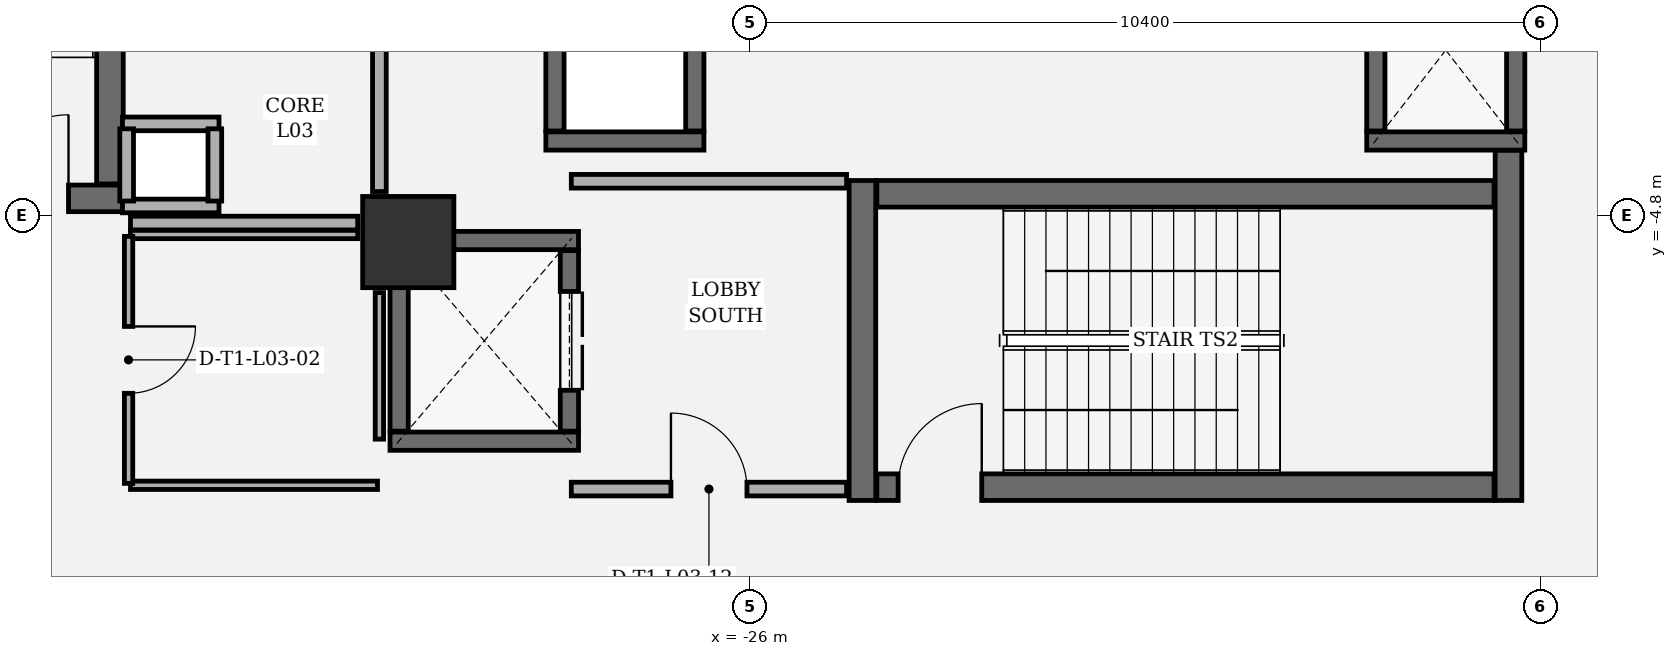
"""IFC4 building model, lengths in metres.
Left out: names, types, materials, properties, quantities, classifications, styles, units other than length and angle.
Written with IfcOpenShell. Run it as: python <this file> out.ifc"""

import sys

from ifc_helpers import new_model, si_unit, direction, frame, frame_2d, origin, origin_2d, place, context, subcontext, project, spatial, rectangle, extrude, element, fill, save


model = new_model("IFC4")
c1 = context("Model", 3, precision=1e-05, world=origin(), true_north=direction((0.0, 1.0)))
c2 = subcontext(c1, "Body", "Model", "MODEL_VIEW")
j1 = project(units=[si_unit("LENGTHUNIT", "METRE"), si_unit("PLANEANGLEUNIT", "RADIAN")], contexts=[c1])
p1 = place(None, origin())
s1 = spatial("IfcSite", under=j1, at=p1, CompositionType="ELEMENT")
p2 = place(p1, origin())
s2 = spatial("IfcBuilding", under=s1, at=p2, CompositionType="ELEMENT")
p3 = place(p2, frame((0.0, 0.0, 17.0)))
s3 = spatial("IfcBuildingStorey", under=s2, at=p3, CompositionType="ELEMENT", Elevation=17.0)
p4 = place(p3, frame((-30.5, -5.15, 0.0), z_axis=(0.0, 0.0, 1.0), x_axis=(1.0, 0.0, 0.0)))
e1 = element("IfcColumn", 1, at=p4, inside=s3, PredefinedType="COLUMN", context=c2, shape_type="SweptSolid", body=[
    extrude(rectangle(XDim=1.2, YDim=1.2, at=origin_2d()), origin(), (0.0, 0.0, 1.0), 5.0),
])
p5 = place(p3, frame((-13.635, -37.094, 0.0), z_axis=(0.0, 0.0, 1.0), x_axis=(-0.842602364841, 0.538536214905, 0.0)))
e2 = element("IfcWall", 2, at=p5, inside=s3, PredefinedType="SOLIDWALL", context=c2, shape_type="SweptSolid", body=[
    extrude(rectangle(XDim=60.27, YDim=0.38, at=frame_2d((30.135, 0.0))), origin(), (0.0, 0.0, 1.0), 4.74),
])
p6 = place(p5, frame((29.435, 0.0, 0.8)))
e3 = element("IfcOpeningElement", 3, at=p6, cuts=e2, PredefinedType="OPENING", context=c2, shape_type="SweptSolid", body=[
    extrude(rectangle(XDim=1.4, YDim=1.5, at=frame_2d((0.7, 0.75))), frame((0.0, 0.2, 0.0), z_axis=(0.0, -1.0, 0.0), x_axis=(1.0, 0.0, 0.0)), (0.0, 0.0, 1.0), 0.4),
])
p7 = place(p3, frame((-24.525, -4.34, 0.0), z_axis=(0.0, 0.0, 1.0), x_axis=(0.0, -1.0, 0.0)))
e4 = element("IfcWall", 4, at=p7, inside=s3, PredefinedType="SHEAR", context=c2, shape_type="SweptSolid", body=[
    extrude(rectangle(XDim=4.21, YDim=0.35, at=frame_2d((2.105, 0.0))), origin(), (0.0, 0.0, 1.0), 4.74),
])
p8 = place(p3, frame((-16.025, -8.55, 0.0), z_axis=(0.0, 0.0, 1.0), x_axis=(0.0, 1.0, 0.0)))
e5 = element("IfcWall", 5, at=p8, inside=s3, PredefinedType="SHEAR", context=c2, shape_type="SweptSolid", body=[
    extrude(rectangle(XDim=4.61, YDim=0.35, at=frame_2d((2.305, 0.0))), origin(), (0.0, 0.0, 1.0), 4.74),
])
p9 = place(p3, frame((-24.335, -8.375, 0.0), z_axis=(0.0, 0.0, 1.0), x_axis=(1.0, 0.0, 0.0)))
e6 = element("IfcWall", 6, at=p9, inside=s3, PredefinedType="SHEAR", context=c2, shape_type="SweptSolid", body=[
    extrude(rectangle(XDim=8.12, YDim=0.35, at=frame_2d((4.06, 0.0))), origin(), (0.0, 0.0, 1.0), 4.74),
])
p10 = place(p9, frame((0.28, 0.0, 0.0)))
e7 = element("IfcOpeningElement", 7, at=p10, cuts=e6, PredefinedType="OPENING", context=c2, shape_type="SweptSolid", body=[
    extrude(rectangle(XDim=1.1, YDim=2.2, at=frame_2d((0.55, 1.1))), frame((0.0, 0.185, 0.0), z_axis=(0.0, -1.0, 0.0), x_axis=(1.0, 0.0, 0.0)), (0.0, 0.0, 1.0), 0.37),
])
p11 = place(p3, frame((-16.215, -4.515, 0.0), z_axis=(0.0, 0.0, 1.0), x_axis=(-1.0, 0.0, 0.0)))
e8 = element("IfcWall", 8, at=p11, inside=s3, PredefinedType="SHEAR", context=c2, shape_type="SweptSolid", body=[
    extrude(rectangle(XDim=8.12, YDim=0.35, at=frame_2d((4.06, 0.0))), origin(), (0.0, 0.0, 1.0), 4.74),
])
p12 = place(p3, frame((-38.46, -4.575, 0.0), z_axis=(0.0, 0.0, 1.0), x_axis=(1.0, 0.0, 0.0)))
e9 = element("IfcWall", 9, at=p12, inside=s3, PredefinedType="SHEAR", context=c2, shape_type="SweptSolid", body=[
    extrude(rectangle(XDim=4.21, YDim=0.35, at=frame_2d((2.105, 0.0))), origin(), (0.0, 0.0, 1.0), 4.74),
])
p13 = place(p12, frame((2.39, 0.0, 0.0)))
e10 = element("IfcOpeningElement", 10, at=p13, cuts=e9, PredefinedType="OPENING", context=c2, shape_type="SweptSolid", body=[
    extrude(rectangle(XDim=1.1, YDim=2.2, at=frame_2d((0.55, 1.1))), frame((0.0, 0.185, 0.0), z_axis=(0.0, -1.0, 0.0), x_axis=(1.0, 0.0, 0.0)), (0.0, 0.0, 1.0), 0.37),
])
p14 = place(p3, frame((-34.425, -4.385, 0.0), z_axis=(0.0, 0.0, 1.0), x_axis=(0.0, 1.0, 0.0)))
e11 = element("IfcWall", 11, at=p14, inside=s3, PredefinedType="SHEAR", context=c2, shape_type="SweptSolid", body=[
    extrude(rectangle(XDim=8.77, YDim=0.35, at=frame_2d((4.385, 0.0))), origin(), (0.0, 0.0, 1.0), 4.74),
])
for number, where, z_axis, x_axis in (
    (12, (-28.26, -7.77, 0.0), (0.0, 0.0, 1.0), (-1.0, 0.0, 0.0)),
    (13, (-30.74, -5.13, 0.0), (0.0, 0.0, 1.0), (1.0, 0.0, 0.0)),
):
    element("IfcWall", number, at=place(p3, frame(where, z_axis=z_axis, x_axis=x_axis)), inside=s3, PredefinedType="SHEAR", context=c2, shape_type="SweptSolid", body=[
        extrude(rectangle(XDim=2.48, YDim=0.24, at=frame_2d((1.24, 0.0))), origin(), (0.0, 0.0, 1.0), 4.74),
    ])
p15 = place(p3, frame((-30.62, -7.638, 0.0), z_axis=(0.0, 0.0, 1.0), x_axis=(0.0, 1.0, 0.0)))
e14 = element("IfcWall", 14, at=p15, inside=s3, PredefinedType="SHEAR", context=c2, shape_type="SweptSolid", body=[
    extrude(rectangle(XDim=2.376, YDim=0.24, at=frame_2d((1.188, 0.0))), origin(), (0.0, 0.0, 1.0), 4.74),
])
p16 = place(p3, frame((-28.38, -5.262, 0.0), z_axis=(0.0, 0.0, 1.0), x_axis=(0.0, -1.0, 0.0)))
e15 = element("IfcWall", 15, at=p16, inside=s3, PredefinedType="SHEAR", context=c2, shape_type="SweptSolid", body=[
    extrude(rectangle(XDim=2.376, YDim=0.24, at=frame_2d((1.188, 0.0))), origin(), (0.0, 0.0, 1.0), 4.74),
])
p17 = place(p16, frame((0.538, 0.0, 0.0)))
e16 = element("IfcOpeningElement", 16, at=p17, cuts=e15, PredefinedType="OPENING", context=c2, shape_type="SweptSolid", body=[
    extrude(rectangle(XDim=1.3, YDim=2.3, at=frame_2d((0.65, 1.15))), frame((0.0, 0.13, 0.0), z_axis=(0.0, -1.0, 0.0), x_axis=(1.0, 0.0, 0.0)), (0.0, 0.0, 1.0), 0.26),
])
p18 = place(p3, frame((-26.61, -3.82, 0.0), z_axis=(0.0, 0.0, 1.0), x_axis=(-1.0, 0.0, 0.0)))
e17 = element("IfcWall", 17, at=p18, inside=s3, PredefinedType="SHEAR", context=c2, shape_type="SweptSolid", body=[
    extrude(rectangle(XDim=2.08, YDim=0.24, at=frame_2d((1.04, 0.0))), origin(), (0.0, 0.0, 1.0), 4.74),
])
for number, where, z_axis, x_axis in (
    (18, (-28.57, -3.688, 0.0), (0.0, 0.0, 1.0), (0.0, 1.0, 0.0)),
    (19, (-26.73, -1.562, 0.0), (0.0, 0.0, 1.0), (0.0, -1.0, 0.0)),
):
    element("IfcWall", number, at=place(p3, frame(where, z_axis=z_axis, x_axis=x_axis)), inside=s3, PredefinedType="SHEAR", context=c2, shape_type="SweptSolid", body=[
        extrude(rectangle(XDim=2.126, YDim=0.24, at=frame_2d((1.063, 0.0))), origin(), (0.0, 0.0, 1.0), 4.74),
    ])
p19 = place(p3, frame((-15.81, -3.82, 0.0), z_axis=(0.0, 0.0, 1.0), x_axis=(-1.0, 0.0, 0.0)))
e20 = element("IfcWall", 20, at=p19, inside=s3, PredefinedType="SHEAR", context=c2, shape_type="SweptSolid", body=[
    extrude(rectangle(XDim=2.08, YDim=0.24, at=frame_2d((1.04, 0.0))), origin(), (0.0, 0.0, 1.0), 4.74),
])
for number, where, z_axis, x_axis in (
    (21, (-17.77, -3.688, 0.0), (0.0, 0.0, 1.0), (0.0, 1.0, 0.0)),
    (22, (-15.93, -1.562, 0.0), (0.0, 0.0, 1.0), (0.0, -1.0, 0.0)),
):
    element("IfcWall", number, at=place(p3, frame(where, z_axis=z_axis, x_axis=x_axis)), inside=s3, PredefinedType="SHEAR", context=c2, shape_type="SweptSolid", body=[
        extrude(rectangle(XDim=2.126, YDim=0.24, at=frame_2d((1.063, 0.0))), origin(), (0.0, 0.0, 1.0), 4.74),
    ])
for number, where, z_axis, x_axis in (
    (23, (-32.99, -4.675, 0.0), (0.0, 0.0, 1.0), (-1.0, 0.0, 0.0)),
    (24, (-34.26, -3.595, 0.0), (0.0, 0.0, 1.0), (1.0, 0.0, 0.0)),
):
    element("IfcWall", number, at=place(p3, frame(where, z_axis=z_axis, x_axis=x_axis)), inside=s3, PredefinedType="PARTITIONING", context=c2, shape_type="SweptSolid", body=[
        extrude(rectangle(XDim=1.27, YDim=0.18, at=frame_2d((0.635, 0.0))), origin(), (0.0, 0.0, 1.0), 4.74),
    ])
for number, where, z_axis, x_axis in (
    (25, (-34.205, -4.61, 0.0), (0.0, 0.0, 1.0), (0.0, 1.0, 0.0)),
    (26, (-33.045, -3.66, 0.0), (0.0, 0.0, 1.0), (0.0, -1.0, 0.0)),
):
    element("IfcWall", number, at=place(p3, frame(where, z_axis=z_axis, x_axis=x_axis)), inside=s3, PredefinedType="PARTITIONING", context=c2, shape_type="SweptSolid", body=[
        extrude(rectangle(XDim=0.95, YDim=0.18, at=frame_2d((0.475, 0.0))), origin(), (0.0, 0.0, 1.0), 4.74),
    ])
p20 = place(p3, frame((-28.355, -8.4, 0.0), z_axis=(0.0, 0.0, 1.0), x_axis=(1.0, 0.0, 0.0)))
e27 = element("IfcWall", 27, at=p20, inside=s3, PredefinedType="PARTITIONING", context=c2, shape_type="SweptSolid", body=[
    extrude(rectangle(XDim=3.622, YDim=0.18, at=frame_2d((1.811, 0.0))), origin(), (0.0, 0.0, 1.0), 4.74),
])
p21 = place(p20, frame((1.311, 0.0, 0.0)))
e28 = element("IfcOpeningElement", 28, at=p21, cuts=e27, PredefinedType="OPENING", context=c2, shape_type="SweptSolid", body=[
    extrude(rectangle(XDim=1.0, YDim=2.15, at=frame_2d((0.5, 1.075))), frame((0.0, 0.1, 0.0), z_axis=(0.0, -1.0, 0.0), x_axis=(1.0, 0.0, 0.0)), (0.0, 0.0, 1.0), 0.2),
])
p22 = place(p3, frame((-24.733, -4.35, 0.0), z_axis=(0.0, 0.0, 1.0), x_axis=(-1.0, 0.0, 0.0)))
e29 = element("IfcWall", 29, at=p22, inside=s3, PredefinedType="PARTITIONING", context=c2, shape_type="SweptSolid", body=[
    extrude(rectangle(XDim=3.622, YDim=0.18, at=frame_2d((1.811, 0.0))), origin(), (0.0, 0.0, 1.0), 4.74),
])
p23 = place(p3, frame((-34.155, -8.35, 0.0), z_axis=(0.0, 0.0, 1.0), x_axis=(1.0, 0.0, 0.0)))
e30 = element("IfcWall", 30, at=p23, inside=s3, PredefinedType="PARTITIONING", context=c2, shape_type="SweptSolid", body=[
    extrude(rectangle(XDim=3.25, YDim=0.11, at=frame_2d((1.625, 0.0))), origin(), (0.0, 0.0, 1.0), 4.74),
])
p24 = place(p3, frame((-30.88, -7.743, 0.0), z_axis=(0.0, 0.0, 1.0), x_axis=(0.0, 1.0, 0.0)))
e31 = element("IfcWall", 31, at=p24, inside=s3, PredefinedType="PARTITIONING", context=c2, shape_type="SweptSolid", body=[
    extrude(rectangle(XDim=1.928, YDim=0.11, at=frame_2d((0.964, 0.0))), origin(), (0.0, 0.0, 1.0), 4.74),
])
p25 = place(p3, frame((-31.165, -5.05, 0.0), z_axis=(0.0, 0.0, 1.0), x_axis=(-1.0, 0.0, 0.0)))
e32 = element("IfcWall", 32, at=p25, inside=s3, PredefinedType="PARTITIONING", context=c2, shape_type="SweptSolid", body=[
    extrude(rectangle(XDim=2.99, YDim=0.11, at=frame_2d((1.495, 0.0))), origin(), (0.0, 0.0, 1.0), 4.74),
])
p26 = place(p3, frame((-34.18, -5.075, 0.0), z_axis=(0.0, 0.0, 1.0), x_axis=(0.0, -1.0, 0.0)))
e33 = element("IfcWall", 33, at=p26, inside=s3, PredefinedType="PARTITIONING", context=c2, shape_type="SweptSolid", body=[
    extrude(rectangle(XDim=3.25, YDim=0.11, at=frame_2d((1.625, 0.0))), origin(), (0.0, 0.0, 1.0), 4.74),
])
p27 = place(p26, frame((1.185, 0.0, 0.0)))
e34 = element("IfcOpeningElement", 34, at=p27, cuts=e33, PredefinedType="OPENING", context=c2, shape_type="SweptSolid", body=[
    extrude(rectangle(XDim=0.88, YDim=2.1, at=frame_2d((0.44, 1.05))), frame((0.0, 0.065, 0.0), z_axis=(0.0, -1.0, 0.0), x_axis=(1.0, 0.0, 0.0)), (0.0, 0.0, 1.0), 0.13),
])
p28 = place(p3, frame((-34.155, -4.9, 0.0), z_axis=(0.0, 0.0, 1.0), x_axis=(1.0, 0.0, 0.0)))
e35 = element("IfcWall", 35, at=p28, inside=s3, PredefinedType="PARTITIONING", context=c2, shape_type="SweptSolid", body=[
    extrude(rectangle(XDim=2.99, YDim=0.18, at=frame_2d((1.495, 0.0))), origin(), (0.0, 0.0, 1.0), 4.74),
])
p29 = place(p3, frame((-30.88, -4.485, 0.0), z_axis=(0.0, 0.0, 1.0), x_axis=(0.0, 1.0, 0.0)))
e36 = element("IfcWall", 36, at=p29, inside=s3, PredefinedType="PARTITIONING", context=c2, shape_type="SweptSolid", body=[
    extrude(rectangle(XDim=2.86, YDim=0.18, at=frame_2d((1.43, 0.0))), origin(), (0.0, 0.0, 1.0), 4.74),
])
p30 = place(p10, origin())
e37 = element("IfcDoor", 37, at=p30, inside=s3, OperationType="SINGLE_SWING_RIGHT", PredefinedType="DOOR", context=c2, shape_type="SweptSolid", body=[
    extrude(rectangle(XDim=1.1, YDim=2.2, at=frame_2d((0.55, 1.1))), frame((0.0, 0.025, 0.0), z_axis=(0.0, -1.0, 0.0), x_axis=(1.0, 0.0, 0.0)), (0.0, 0.0, 1.0), 0.05),
])
fill(e7, e37)
p31 = place(p13, origin())
e38 = element("IfcDoor", 38, at=p31, inside=s3, OperationType="SINGLE_SWING_RIGHT", PredefinedType="DOOR", context=c2, shape_type="SweptSolid", body=[
    extrude(rectangle(XDim=1.1, YDim=2.2, at=frame_2d((0.55, 1.1))), frame((0.0, 0.025, 0.0), z_axis=(0.0, -1.0, 0.0), x_axis=(1.0, 0.0, 0.0)), (0.0, 0.0, 1.0), 0.05),
])
fill(e10, e38)
p32 = place(p17, origin())
e39 = element("IfcDoor", 39, at=p32, inside=s3, OperationType="DOUBLE_DOOR_SLIDING", PredefinedType="DOOR", context=c2, shape_type="SweptSolid", body=[
    extrude(rectangle(XDim=1.3, YDim=2.3, at=frame_2d((0.65, 1.15))), frame((0.0, 0.025, 0.0), z_axis=(0.0, -1.0, 0.0), x_axis=(1.0, 0.0, 0.0)), (0.0, 0.0, 1.0), 0.05),
])
fill(e16, e39)
p33 = place(p27, origin())
e40 = element("IfcDoor", 40, at=p33, inside=s3, OperationType="SINGLE_SWING_LEFT", PredefinedType="DOOR", context=c2, shape_type="SweptSolid", body=[
    extrude(rectangle(XDim=0.88, YDim=2.1, at=frame_2d((0.44, 1.05))), frame((0.0, 0.025, 0.0), z_axis=(0.0, -1.0, 0.0), x_axis=(1.0, 0.0, 0.0)), (0.0, 0.0, 1.0), 0.05),
])
fill(e34, e40)
p34 = place(p21, origin())
e41 = element("IfcDoor", 41, at=p34, inside=s3, OperationType="SINGLE_SWING_LEFT", PredefinedType="DOOR", context=c2, shape_type="SweptSolid", body=[
    extrude(rectangle(XDim=1.0, YDim=2.15, at=frame_2d((0.5, 1.075))), frame((0.0, 0.025, 0.0), z_axis=(0.0, -1.0, 0.0), x_axis=(1.0, 0.0, 0.0)), (0.0, 0.0, 1.0), 0.05),
])
fill(e28, e41)
save(model, sys.argv[1])
